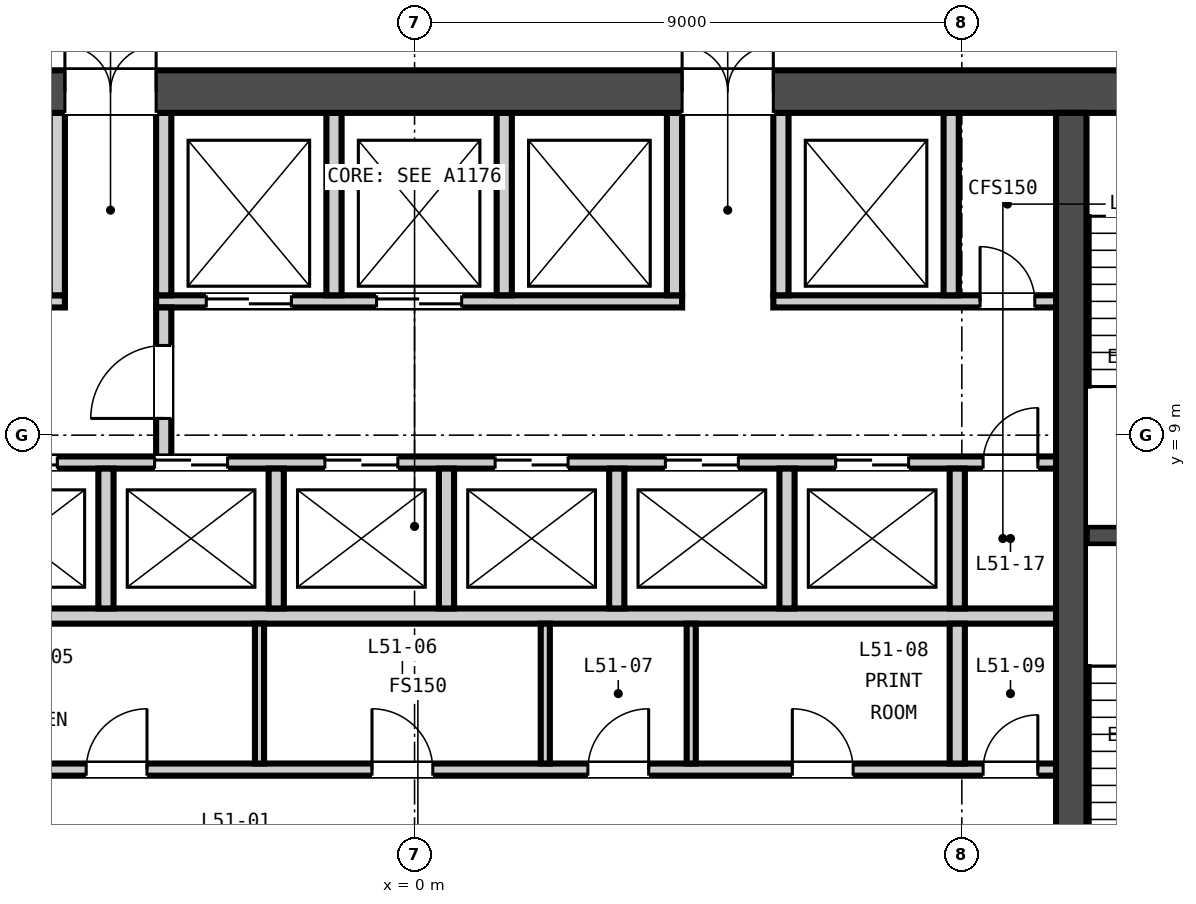
"""IFC4 building model, lengths in metres.
Left out: names, types, materials, properties, quantities, classifications, styles, units other than length and angle.
Written with IfcOpenShell. Run it as: python <this file> out.ifc"""

import sys

from ifc_helpers import new_model, si_unit, direction, frame, frame_2d, origin, place, context, subcontext, project, spatial, rectangle, extrude, element, fill, save


model = new_model("IFC4")
c1 = context("Model", 3, precision=1e-05, world=origin(), true_north=direction((0.0, 1.0)))
c2 = subcontext(c1, "Body", "Model", "MODEL_VIEW")
j1 = project(units=[si_unit("LENGTHUNIT", "METRE"), si_unit("PLANEANGLEUNIT", "RADIAN")], contexts=[c1])
p1 = place(None, origin())
s1 = spatial("IfcSite", under=j1, at=p1, CompositionType="ELEMENT")
p2 = place(p1, origin())
s2 = spatial("IfcBuilding", under=s1, at=p2, CompositionType="ELEMENT")
p3 = place(p2, frame((0.0, 0.0, 203.65)))
s3 = spatial("IfcBuildingStorey", under=s2, at=p3, CompositionType="ELEMENT", Elevation=203.65)
p4 = place(p3, frame((-15.0, 14.65, -0.15), z_axis=(0.0, 0.0, 1.0), x_axis=(1.0, 0.0, 0.0)))
e1 = element("IfcWall", 1, at=p4, inside=s3, PredefinedType="SOLIDWALL", context=c2, shape_type="SweptSolid", body=[
    extrude(rectangle(XDim=30.0, YDim=0.7, at=frame_2d((15.0, 0.0))), origin(), (0.0, 0.0, 1.0), 3.5),
])
p5 = place(p4, frame((9.25, 0.0, 0.15)))
e2 = element("IfcOpeningElement", 2, at=p5, cuts=e1, PredefinedType="OPENING", context=c2, shape_type="SweptSolid", body=[
    extrude(rectangle(XDim=1.5, YDim=2.1, at=frame_2d((0.75, 1.05))), frame((0.0, 0.36, 0.0), z_axis=(0.0, -1.0, 0.0), x_axis=(1.0, 0.0, 0.0)), (0.0, 0.0, 1.0), 0.72),
])
p6 = place(p4, frame((19.4, 0.0, 0.15)))
e3 = element("IfcOpeningElement", 3, at=p6, cuts=e1, PredefinedType="OPENING", context=c2, shape_type="SweptSolid", body=[
    extrude(rectangle(XDim=1.5, YDim=2.1, at=frame_2d((0.75, 1.05))), frame((0.0, 0.36, 0.0), z_axis=(0.0, -1.0, 0.0), x_axis=(1.0, 0.0, 0.0)), (0.0, 0.0, 1.0), 0.72),
])
p7 = place(p4, frame((1.5, 0.0, 0.15)))
e4 = element("IfcOpeningElement", 4, at=p7, cuts=e1, PredefinedType="OPENING", context=c2, shape_type="SweptSolid", body=[
    extrude(rectangle(XDim=1.2, YDim=2.1, at=frame_2d((0.6, 1.05))), frame((0.0, 0.36, 0.0), z_axis=(0.0, -1.0, 0.0), x_axis=(1.0, 0.0, 0.0)), (0.0, 0.0, 1.0), 0.72),
])
p8 = place(p4, frame((27.3, 0.0, 0.15)))
e5 = element("IfcOpeningElement", 5, at=p8, cuts=e1, PredefinedType="OPENING", context=c2, shape_type="SweptSolid", body=[
    extrude(rectangle(XDim=1.2, YDim=2.1, at=frame_2d((0.6, 1.05))), frame((0.0, 0.36, 0.0), z_axis=(0.0, -1.0, 0.0), x_axis=(1.0, 0.0, 0.0)), (0.0, 0.0, 1.0), 0.72),
])
p9 = place(p3, frame((10.8, 0.7, -0.15), z_axis=(0.0, 0.0, 1.0), x_axis=(0.0, 1.0, 0.0)))
e6 = element("IfcWall", 6, at=p9, inside=s3, PredefinedType="SOLIDWALL", context=c2, shape_type="SweptSolid", body=[
    extrude(rectangle(XDim=13.6, YDim=0.5, at=frame_2d((6.8, 0.0))), origin(), (0.0, 0.0, 1.0), 3.5),
])
p10 = place(p3, frame((-10.55, 3.5, 0.0), z_axis=(0.0, 0.0, 1.0), x_axis=(1.0, 0.0, 0.0)))
e7 = element("IfcWall", 7, at=p10, inside=s3, PredefinedType="PARTITIONING", context=c2, shape_type="SweptSolid", body=[
    extrude(rectangle(XDim=21.1, YDim=0.2, at=frame_2d((10.55, 0.0))), origin(), (0.0, 0.0, 1.0), 3.35),
])
p11 = place(p10, frame((1.113, 0.0, 0.0)))
e8 = element("IfcOpeningElement", 8, at=p11, cuts=e7, PredefinedType="OPENING", context=c2, shape_type="SweptSolid", body=[
    extrude(rectangle(XDim=1.0, YDim=2.1, at=frame_2d((0.5, 1.05))), frame((0.0, 0.11, 0.0), z_axis=(0.0, -1.0, 0.0), x_axis=(1.0, 0.0, 0.0)), (0.0, 0.0, 1.0), 0.22),
])
p12 = place(p10, frame((5.15, 0.0, 0.0)))
e9 = element("IfcOpeningElement", 9, at=p12, cuts=e7, PredefinedType="OPENING", context=c2, shape_type="SweptSolid", body=[
    extrude(rectangle(XDim=1.0, YDim=2.1, at=frame_2d((0.5, 1.05))), frame((0.0, 0.11, 0.0), z_axis=(0.0, -1.0, 0.0), x_axis=(1.0, 0.0, 0.0)), (0.0, 0.0, 1.0), 0.22),
])
p13 = place(p10, frame((9.85, 0.0, 0.0)))
e10 = element("IfcOpeningElement", 10, at=p13, cuts=e7, PredefinedType="OPENING", context=c2, shape_type="SweptSolid", body=[
    extrude(rectangle(XDim=1.0, YDim=2.1, at=frame_2d((0.5, 1.05))), frame((0.0, 0.11, 0.0), z_axis=(0.0, -1.0, 0.0), x_axis=(1.0, 0.0, 0.0)), (0.0, 0.0, 1.0), 0.22),
])
p14 = place(p10, frame((13.4, 0.0, 0.0)))
e11 = element("IfcOpeningElement", 11, at=p14, cuts=e7, PredefinedType="OPENING", context=c2, shape_type="SweptSolid", body=[
    extrude(rectangle(XDim=1.0, YDim=2.1, at=frame_2d((0.5, 1.05))), frame((0.0, 0.11, 0.0), z_axis=(0.0, -1.0, 0.0), x_axis=(1.0, 0.0, 0.0)), (0.0, 0.0, 1.0), 0.22),
])
p15 = place(p10, frame((16.762, 0.0, 0.0)))
e12 = element("IfcOpeningElement", 12, at=p15, cuts=e7, PredefinedType="OPENING", context=c2, shape_type="SweptSolid", body=[
    extrude(rectangle(XDim=1.0, YDim=2.1, at=frame_2d((0.5, 1.05))), frame((0.0, 0.11, 0.0), z_axis=(0.0, -1.0, 0.0), x_axis=(1.0, 0.0, 0.0)), (0.0, 0.0, 1.0), 0.22),
])
p16 = place(p10, frame((19.9, 0.0, 0.0)))
e13 = element("IfcOpeningElement", 13, at=p16, cuts=e7, PredefinedType="OPENING", context=c2, shape_type="SweptSolid", body=[
    extrude(rectangle(XDim=0.9, YDim=2.1, at=frame_2d((0.45, 1.05))), frame((0.0, 0.11, 0.0), z_axis=(0.0, -1.0, 0.0), x_axis=(1.0, 0.0, 0.0)), (0.0, 0.0, 1.0), 0.22),
])
p17 = place(p3, frame((-10.55, 6.025, 0.0), z_axis=(0.0, 0.0, 1.0), x_axis=(1.0, 0.0, 0.0)))
e14 = element("IfcWall", 14, at=p17, inside=s3, PredefinedType="PARTITIONING", context=c2, shape_type="SweptSolid", body=[
    extrude(rectangle(XDim=21.1, YDim=0.25, at=frame_2d((10.55, 0.0))), origin(), (0.0, 0.0, 1.0), 3.35),
])
p18 = place(p3, frame((-10.55, 8.55, 0.0), z_axis=(0.0, 0.0, 1.0), x_axis=(1.0, 0.0, 0.0)))
e15 = element("IfcWall", 15, at=p18, inside=s3, PredefinedType="PARTITIONING", context=c2, shape_type="SweptSolid", body=[
    extrude(rectangle(XDim=21.1, YDim=0.2, at=frame_2d((10.55, 0.0))), origin(), (0.0, 0.0, 1.0), 3.35),
])
p19 = place(p18, frame((0.675, 0.0, 0.0)))
e16 = element("IfcOpeningElement", 16, at=p19, cuts=e15, PredefinedType="OPENING", context=c2, shape_type="SweptSolid", body=[
    extrude(rectangle(XDim=1.2, YDim=2.1, at=frame_2d((0.6, 1.05))), frame((0.0, 0.11, 0.0), z_axis=(0.0, -1.0, 0.0), x_axis=(1.0, 0.0, 0.0)), (0.0, 0.0, 1.0), 0.22),
])
p20 = place(p18, frame((3.475, 0.0, 0.0)))
e17 = element("IfcOpeningElement", 17, at=p20, cuts=e15, PredefinedType="OPENING", context=c2, shape_type="SweptSolid", body=[
    extrude(rectangle(XDim=1.2, YDim=2.1, at=frame_2d((0.6, 1.05))), frame((0.0, 0.11, 0.0), z_axis=(0.0, -1.0, 0.0), x_axis=(1.0, 0.0, 0.0)), (0.0, 0.0, 1.0), 0.22),
])
p21 = place(p18, frame((6.275, 0.0, 0.0)))
e18 = element("IfcOpeningElement", 18, at=p21, cuts=e15, PredefinedType="OPENING", context=c2, shape_type="SweptSolid", body=[
    extrude(rectangle(XDim=1.2, YDim=2.1, at=frame_2d((0.6, 1.05))), frame((0.0, 0.11, 0.0), z_axis=(0.0, -1.0, 0.0), x_axis=(1.0, 0.0, 0.0)), (0.0, 0.0, 1.0), 0.22),
])
p22 = place(p18, frame((9.075, 0.0, 0.0)))
e19 = element("IfcOpeningElement", 19, at=p22, cuts=e15, PredefinedType="OPENING", context=c2, shape_type="SweptSolid", body=[
    extrude(rectangle(XDim=1.2, YDim=2.1, at=frame_2d((0.6, 1.05))), frame((0.0, 0.11, 0.0), z_axis=(0.0, -1.0, 0.0), x_axis=(1.0, 0.0, 0.0)), (0.0, 0.0, 1.0), 0.22),
])
p23 = place(p18, frame((11.875, 0.0, 0.0)))
e20 = element("IfcOpeningElement", 20, at=p23, cuts=e15, PredefinedType="OPENING", context=c2, shape_type="SweptSolid", body=[
    extrude(rectangle(XDim=1.2, YDim=2.1, at=frame_2d((0.6, 1.05))), frame((0.0, 0.11, 0.0), z_axis=(0.0, -1.0, 0.0), x_axis=(1.0, 0.0, 0.0)), (0.0, 0.0, 1.0), 0.22),
])
p24 = place(p18, frame((14.675, 0.0, 0.0)))
e21 = element("IfcOpeningElement", 21, at=p24, cuts=e15, PredefinedType="OPENING", context=c2, shape_type="SweptSolid", body=[
    extrude(rectangle(XDim=1.2, YDim=2.1, at=frame_2d((0.6, 1.05))), frame((0.0, 0.11, 0.0), z_axis=(0.0, -1.0, 0.0), x_axis=(1.0, 0.0, 0.0)), (0.0, 0.0, 1.0), 0.22),
])
p25 = place(p18, frame((17.475, 0.0, 0.0)))
e22 = element("IfcOpeningElement", 22, at=p25, cuts=e15, PredefinedType="OPENING", context=c2, shape_type="SweptSolid", body=[
    extrude(rectangle(XDim=1.2, YDim=2.1, at=frame_2d((0.6, 1.05))), frame((0.0, 0.11, 0.0), z_axis=(0.0, -1.0, 0.0), x_axis=(1.0, 0.0, 0.0)), (0.0, 0.0, 1.0), 0.22),
])
p26 = place(p18, frame((19.9, 0.0, 0.0)))
e23 = element("IfcOpeningElement", 23, at=p26, cuts=e15, PredefinedType="OPENING", context=c2, shape_type="SweptSolid", body=[
    extrude(rectangle(XDim=0.9, YDim=2.1, at=frame_2d((0.45, 1.05))), frame((0.0, 0.11, 0.0), z_axis=(0.0, -1.0, 0.0), x_axis=(1.0, 0.0, 0.0)), (0.0, 0.0, 1.0), 0.22),
])
p27 = place(p3, frame((-10.55, 11.2, 0.0), z_axis=(0.0, 0.0, 1.0), x_axis=(1.0, 0.0, 0.0)))
e24 = element("IfcWall", 24, at=p27, inside=s3, PredefinedType="PARTITIONING", context=c2, shape_type="SweptSolid", body=[
    extrude(rectangle(XDim=4.8, YDim=0.2, at=frame_2d((2.4, 0.0))), origin(), (0.0, 0.0, 1.0), 3.35),
])
p28 = place(p27, frame((0.525, 0.0, 0.0)))
e25 = element("IfcOpeningElement", 25, at=p28, cuts=e24, PredefinedType="OPENING", context=c2, shape_type="SweptSolid", body=[
    extrude(rectangle(XDim=1.1, YDim=2.1, at=frame_2d((0.55, 1.05))), frame((0.0, 0.11, 0.0), z_axis=(0.0, -1.0, 0.0), x_axis=(1.0, 0.0, 0.0)), (0.0, 0.0, 1.0), 0.22),
])
p29 = place(p27, frame((2.925, 0.0, 0.0)))
e26 = element("IfcOpeningElement", 26, at=p29, cuts=e24, PredefinedType="OPENING", context=c2, shape_type="SweptSolid", body=[
    extrude(rectangle(XDim=1.1, YDim=2.1, at=frame_2d((0.55, 1.05))), frame((0.0, 0.11, 0.0), z_axis=(0.0, -1.0, 0.0), x_axis=(1.0, 0.0, 0.0)), (0.0, 0.0, 1.0), 0.22),
])
p30 = place(p3, frame((-4.25, 11.2, 0.0), z_axis=(0.0, 0.0, 1.0), x_axis=(1.0, 0.0, 0.0)))
e27 = element("IfcWall", 27, at=p30, inside=s3, PredefinedType="PARTITIONING", context=c2, shape_type="SweptSolid", body=[
    extrude(rectangle(XDim=8.65, YDim=0.2, at=frame_2d((4.325, 0.0))), origin(), (0.0, 0.0, 1.0), 3.35),
])
p31 = place(p30, frame((0.825, 0.0, 0.0)))
e28 = element("IfcOpeningElement", 28, at=p31, cuts=e27, PredefinedType="OPENING", context=c2, shape_type="SweptSolid", body=[
    extrude(rectangle(XDim=1.4, YDim=2.1, at=frame_2d((0.7, 1.05))), frame((0.0, 0.11, 0.0), z_axis=(0.0, -1.0, 0.0), x_axis=(1.0, 0.0, 0.0)), (0.0, 0.0, 1.0), 0.22),
])
p32 = place(p30, frame((3.625, 0.0, 0.0)))
e29 = element("IfcOpeningElement", 29, at=p32, cuts=e27, PredefinedType="OPENING", context=c2, shape_type="SweptSolid", body=[
    extrude(rectangle(XDim=1.4, YDim=2.1, at=frame_2d((0.7, 1.05))), frame((0.0, 0.11, 0.0), z_axis=(0.0, -1.0, 0.0), x_axis=(1.0, 0.0, 0.0)), (0.0, 0.0, 1.0), 0.22),
])
p33 = place(p3, frame((5.9, 11.2, 0.0), z_axis=(0.0, 0.0, 1.0), x_axis=(1.0, 0.0, 0.0)))
e30 = element("IfcWall", 30, at=p33, inside=s3, PredefinedType="PARTITIONING", context=c2, shape_type="SweptSolid", body=[
    extrude(rectangle(XDim=4.65, YDim=0.2, at=frame_2d((2.325, 0.0))), origin(), (0.0, 0.0, 1.0), 3.35),
])
p34 = place(p33, frame((3.4, 0.0, 0.0)))
e31 = element("IfcOpeningElement", 31, at=p34, cuts=e30, PredefinedType="OPENING", context=c2, shape_type="SweptSolid", body=[
    extrude(rectangle(XDim=0.9, YDim=2.1, at=frame_2d((0.45, 1.05))), frame((0.0, 0.11, 0.0), z_axis=(0.0, -1.0, 0.0), x_axis=(1.0, 0.0, 0.0)), (0.0, 0.0, 1.0), 0.22),
])
p35 = place(p3, frame((-4.125, 8.65, 0.0), z_axis=(0.0, 0.0, 1.0), x_axis=(0.0, 1.0, 0.0)))
e32 = element("IfcWall", 32, at=p35, inside=s3, PredefinedType="PARTITIONING", context=c2, shape_type="SweptSolid", body=[
    extrude(rectangle(XDim=2.45, YDim=0.25, at=frame_2d((1.225, 0.0))), origin(), (0.0, 0.0, 1.0), 3.35),
])
p36 = place(p35, frame((0.625, 0.0, 0.0)))
e33 = element("IfcOpeningElement", 33, at=p36, cuts=e32, PredefinedType="OPENING", context=c2, shape_type="SweptSolid", body=[
    extrude(rectangle(XDim=1.2, YDim=2.1, at=frame_2d((0.6, 1.05))), frame((0.0, 0.135, 0.0), z_axis=(0.0, -1.0, 0.0), x_axis=(1.0, 0.0, 0.0)), (0.0, 0.0, 1.0), 0.27),
])
for number, where, z_axis, x_axis in (
    (34, (-2.55, 3.6, 0.0), (0.0, 0.0, 1.0), (0.0, 1.0, 0.0)),
    (35, (2.15, 3.6, 0.0), (0.0, 0.0, 1.0), (0.0, 1.0, 0.0)),
    (36, (4.55, 3.6, 0.0), (0.0, 0.0, 1.0), (0.0, 1.0, 0.0)),
):
    element("IfcWall", number, at=place(p3, frame(where, z_axis=z_axis, x_axis=x_axis)), inside=s3, PredefinedType="PARTITIONING", context=c2, shape_type="SweptSolid", body=[
        extrude(rectangle(XDim=2.3, YDim=0.15, at=frame_2d((1.15, 0.0))), origin(), (0.0, 0.0, 1.0), 3.35),
    ])
p37 = place(p3, frame((8.925, 3.6, 0.0), z_axis=(0.0, 0.0, 1.0), x_axis=(0.0, 1.0, 0.0)))
e37 = element("IfcWall", 37, at=p37, inside=s3, PredefinedType="PARTITIONING", context=c2, shape_type="SweptSolid", body=[
    extrude(rectangle(XDim=2.3, YDim=0.25, at=frame_2d((1.15, 0.0))), origin(), (0.0, 0.0, 1.0), 3.35),
])
for number, where, z_axis, x_axis in (
    (38, (-5.075, 6.15, 0.0), (0.0, 0.0, 1.0), (0.0, 1.0, 0.0)),
    (39, (-2.275, 6.15, 0.0), (0.0, 0.0, 1.0), (0.0, 1.0, 0.0)),
    (40, (0.525, 6.15, 0.0), (0.0, 0.0, 1.0), (0.0, 1.0, 0.0)),
    (41, (3.325, 6.15, 0.0), (0.0, 0.0, 1.0), (0.0, 1.0, 0.0)),
    (42, (6.125, 6.15, 0.0), (0.0, 0.0, 1.0), (0.0, 1.0, 0.0)),
    (43, (8.925, 6.15, 0.0), (0.0, 0.0, 1.0), (0.0, 1.0, 0.0)),
):
    element("IfcWall", number, at=place(p3, frame(where, z_axis=z_axis, x_axis=x_axis)), inside=s3, PredefinedType="PARTITIONING", context=c2, shape_type="SweptSolid", body=[
        extrude(rectangle(XDim=2.3, YDim=0.25, at=frame_2d((1.15, 0.0))), origin(), (0.0, 0.0, 1.0), 3.35),
    ])
for number, where, z_axis, x_axis in (
    (44, (-5.875, 11.3, 0.0), (0.0, 0.0, 1.0), (0.0, 1.0, 0.0)),
    (45, (-4.125, 11.3, 0.0), (0.0, 0.0, 1.0), (0.0, 1.0, 0.0)),
    (46, (-1.325, 11.3, 0.0), (0.0, 0.0, 1.0), (0.0, 1.0, 0.0)),
    (47, (1.475, 11.3, 0.0), (0.0, 0.0, 1.0), (0.0, 1.0, 0.0)),
    (48, (4.275, 11.3, 0.0), (0.0, 0.0, 1.0), (0.0, 1.0, 0.0)),
    (49, (6.025, 11.3, 0.0), (0.0, 0.0, 1.0), (0.0, 1.0, 0.0)),
    (50, (8.825, 11.3, 0.0), (0.0, 0.0, 1.0), (0.0, 1.0, 0.0)),
):
    element("IfcWall", number, at=place(p3, frame(where, z_axis=z_axis, x_axis=x_axis)), inside=s3, PredefinedType="PARTITIONING", context=c2, shape_type="SweptSolid", body=[
        extrude(rectangle(XDim=3.0, YDim=0.25, at=frame_2d((1.5, 0.0))), origin(), (0.0, 0.0, 1.0), 3.35),
    ])
p38 = place(p3, frame((11.05, 7.35, 0.0), z_axis=(0.0, 0.0, 1.0), x_axis=(1.0, 0.0, 0.0)))
e51 = element("IfcWall", 51, at=p38, inside=s3, PredefinedType="SOLIDWALL", context=c2, shape_type="SweptSolid", body=[
    extrude(rectangle(XDim=2.95, YDim=0.3, at=frame_2d((1.475, 0.0))), origin(), (0.0, 0.0, 1.0), 3.35),
])
p39 = place(p36, origin())
e52 = element("IfcDoor", 52, at=p39, inside=s3, OperationType="SINGLE_SWING_LEFT", PredefinedType="DOOR", context=c2, shape_type="SweptSolid", body=[
    extrude(rectangle(XDim=1.2, YDim=2.1, at=frame_2d((0.6, 1.05))), frame((0.0, 0.025, 0.0), z_axis=(0.0, -1.0, 0.0), x_axis=(1.0, 0.0, 0.0)), (0.0, 0.0, 1.0), 0.05),
])
fill(e33, e52)
p40 = place(p12, origin())
e53 = element("IfcDoor", 53, at=p40, inside=s3, OperationType="SINGLE_SWING_RIGHT", PredefinedType="DOOR", context=c2, shape_type="SweptSolid", body=[
    extrude(rectangle(XDim=1.0, YDim=2.1, at=frame_2d((0.5, 1.05))), frame((0.0, 0.025, 0.0), z_axis=(0.0, -1.0, 0.0), x_axis=(1.0, 0.0, 0.0)), (0.0, 0.0, 1.0), 0.05),
])
fill(e9, e53)
p41 = place(p13, origin())
e54 = element("IfcDoor", 54, at=p41, inside=s3, OperationType="SINGLE_SWING_LEFT", PredefinedType="DOOR", context=c2, shape_type="SweptSolid", body=[
    extrude(rectangle(XDim=1.0, YDim=2.1, at=frame_2d((0.5, 1.05))), frame((0.0, 0.025, 0.0), z_axis=(0.0, -1.0, 0.0), x_axis=(1.0, 0.0, 0.0)), (0.0, 0.0, 1.0), 0.05),
])
fill(e10, e54)
p42 = place(p14, origin())
e55 = element("IfcDoor", 55, at=p42, inside=s3, OperationType="SINGLE_SWING_RIGHT", PredefinedType="DOOR", context=c2, shape_type="SweptSolid", body=[
    extrude(rectangle(XDim=1.0, YDim=2.1, at=frame_2d((0.5, 1.05))), frame((0.0, 0.025, 0.0), z_axis=(0.0, -1.0, 0.0), x_axis=(1.0, 0.0, 0.0)), (0.0, 0.0, 1.0), 0.05),
])
fill(e11, e55)
p43 = place(p15, origin())
e56 = element("IfcDoor", 56, at=p43, inside=s3, OperationType="SINGLE_SWING_LEFT", PredefinedType="DOOR", context=c2, shape_type="SweptSolid", body=[
    extrude(rectangle(XDim=1.0, YDim=2.1, at=frame_2d((0.5, 1.05))), frame((0.0, 0.025, 0.0), z_axis=(0.0, -1.0, 0.0), x_axis=(1.0, 0.0, 0.0)), (0.0, 0.0, 1.0), 0.05),
])
fill(e12, e56)
p44 = place(p16, origin())
e57 = element("IfcDoor", 57, at=p44, inside=s3, OperationType="SINGLE_SWING_RIGHT", PredefinedType="DOOR", context=c2, shape_type="SweptSolid", body=[
    extrude(rectangle(XDim=0.9, YDim=2.1, at=frame_2d((0.45, 1.05))), frame((0.0, 0.025, 0.0), z_axis=(0.0, -1.0, 0.0), x_axis=(1.0, 0.0, 0.0)), (0.0, 0.0, 1.0), 0.05),
])
fill(e13, e57)
p45 = place(p20, origin())
e58 = element("IfcDoor", 58, at=p45, inside=s3, OperationType="DOUBLE_DOOR_SLIDING", PredefinedType="DOOR", context=c2, shape_type="SweptSolid", body=[
    extrude(rectangle(XDim=1.2, YDim=2.1, at=frame_2d((0.6, 1.05))), frame((0.0, 0.025, 0.0), z_axis=(0.0, -1.0, 0.0), x_axis=(1.0, 0.0, 0.0)), (0.0, 0.0, 1.0), 0.05),
])
fill(e17, e58)
p46 = place(p21, origin())
e59 = element("IfcDoor", 59, at=p46, inside=s3, OperationType="DOUBLE_DOOR_SLIDING", PredefinedType="DOOR", context=c2, shape_type="SweptSolid", body=[
    extrude(rectangle(XDim=1.2, YDim=2.1, at=frame_2d((0.6, 1.05))), frame((0.0, 0.025, 0.0), z_axis=(0.0, -1.0, 0.0), x_axis=(1.0, 0.0, 0.0)), (0.0, 0.0, 1.0), 0.05),
])
fill(e18, e59)
p47 = place(p22, origin())
e60 = element("IfcDoor", 60, at=p47, inside=s3, OperationType="DOUBLE_DOOR_SLIDING", PredefinedType="DOOR", context=c2, shape_type="SweptSolid", body=[
    extrude(rectangle(XDim=1.2, YDim=2.1, at=frame_2d((0.6, 1.05))), frame((0.0, 0.025, 0.0), z_axis=(0.0, -1.0, 0.0), x_axis=(1.0, 0.0, 0.0)), (0.0, 0.0, 1.0), 0.05),
])
fill(e19, e60)
p48 = place(p23, origin())
e61 = element("IfcDoor", 61, at=p48, inside=s3, OperationType="DOUBLE_DOOR_SLIDING", PredefinedType="DOOR", context=c2, shape_type="SweptSolid", body=[
    extrude(rectangle(XDim=1.2, YDim=2.1, at=frame_2d((0.6, 1.05))), frame((0.0, 0.025, 0.0), z_axis=(0.0, -1.0, 0.0), x_axis=(1.0, 0.0, 0.0)), (0.0, 0.0, 1.0), 0.05),
])
fill(e20, e61)
p49 = place(p24, origin())
e62 = element("IfcDoor", 62, at=p49, inside=s3, OperationType="DOUBLE_DOOR_SLIDING", PredefinedType="DOOR", context=c2, shape_type="SweptSolid", body=[
    extrude(rectangle(XDim=1.2, YDim=2.1, at=frame_2d((0.6, 1.05))), frame((0.0, 0.025, 0.0), z_axis=(0.0, -1.0, 0.0), x_axis=(1.0, 0.0, 0.0)), (0.0, 0.0, 1.0), 0.05),
])
fill(e21, e62)
p50 = place(p25, origin())
e63 = element("IfcDoor", 63, at=p50, inside=s3, OperationType="DOUBLE_DOOR_SLIDING", PredefinedType="DOOR", context=c2, shape_type="SweptSolid", body=[
    extrude(rectangle(XDim=1.2, YDim=2.1, at=frame_2d((0.6, 1.05))), frame((0.0, 0.025, 0.0), z_axis=(0.0, -1.0, 0.0), x_axis=(1.0, 0.0, 0.0)), (0.0, 0.0, 1.0), 0.05),
])
fill(e22, e63)
p51 = place(p26, origin())
e64 = element("IfcDoor", 64, at=p51, inside=s3, OperationType="SINGLE_SWING_RIGHT", PredefinedType="DOOR", context=c2, shape_type="SweptSolid", body=[
    extrude(rectangle(XDim=0.9, YDim=2.1, at=frame_2d((0.45, 1.05))), frame((0.0, 0.025, 0.0), z_axis=(0.0, -1.0, 0.0), x_axis=(1.0, 0.0, 0.0)), (0.0, 0.0, 1.0), 0.05),
])
fill(e23, e64)
p52 = place(p31, origin())
e65 = element("IfcDoor", 65, at=p52, inside=s3, OperationType="DOUBLE_DOOR_SLIDING", PredefinedType="DOOR", context=c2, shape_type="SweptSolid", body=[
    extrude(rectangle(XDim=1.4, YDim=2.1, at=frame_2d((0.7, 1.05))), frame((0.0, 0.025, 0.0), z_axis=(0.0, -1.0, 0.0), x_axis=(1.0, 0.0, 0.0)), (0.0, 0.0, 1.0), 0.05),
])
fill(e28, e65)
p53 = place(p32, origin())
e66 = element("IfcDoor", 66, at=p53, inside=s3, OperationType="DOUBLE_DOOR_SLIDING", PredefinedType="DOOR", context=c2, shape_type="SweptSolid", body=[
    extrude(rectangle(XDim=1.4, YDim=2.1, at=frame_2d((0.7, 1.05))), frame((0.0, 0.025, 0.0), z_axis=(0.0, -1.0, 0.0), x_axis=(1.0, 0.0, 0.0)), (0.0, 0.0, 1.0), 0.05),
])
fill(e29, e66)
p54 = place(p34, origin())
e67 = element("IfcDoor", 67, at=p54, inside=s3, OperationType="SINGLE_SWING_LEFT", PredefinedType="DOOR", context=c2, shape_type="SweptSolid", body=[
    extrude(rectangle(XDim=0.9, YDim=2.1, at=frame_2d((0.45, 1.05))), frame((0.0, 0.025, 0.0), z_axis=(0.0, -1.0, 0.0), x_axis=(1.0, 0.0, 0.0)), (0.0, 0.0, 1.0), 0.05),
])
fill(e31, e67)
p55 = place(p5, origin())
e68 = element("IfcDoor", 68, at=p55, inside=s3, OperationType="DOUBLE_DOOR_SINGLE_SWING", PredefinedType="DOOR", context=c2, shape_type="SweptSolid", body=[
    extrude(rectangle(XDim=1.5, YDim=2.1, at=frame_2d((0.75, 1.05))), frame((0.0, 0.025, 0.0), z_axis=(0.0, -1.0, 0.0), x_axis=(1.0, 0.0, 0.0)), (0.0, 0.0, 1.0), 0.05),
])
fill(e2, e68)
p56 = place(p6, origin())
e69 = element("IfcDoor", 69, at=p56, inside=s3, OperationType="DOUBLE_DOOR_SINGLE_SWING", PredefinedType="DOOR", context=c2, shape_type="SweptSolid", body=[
    extrude(rectangle(XDim=1.5, YDim=2.1, at=frame_2d((0.75, 1.05))), frame((0.0, 0.025, 0.0), z_axis=(0.0, -1.0, 0.0), x_axis=(1.0, 0.0, 0.0)), (0.0, 0.0, 1.0), 0.05),
])
fill(e3, e69)
save(model, sys.argv[1])
